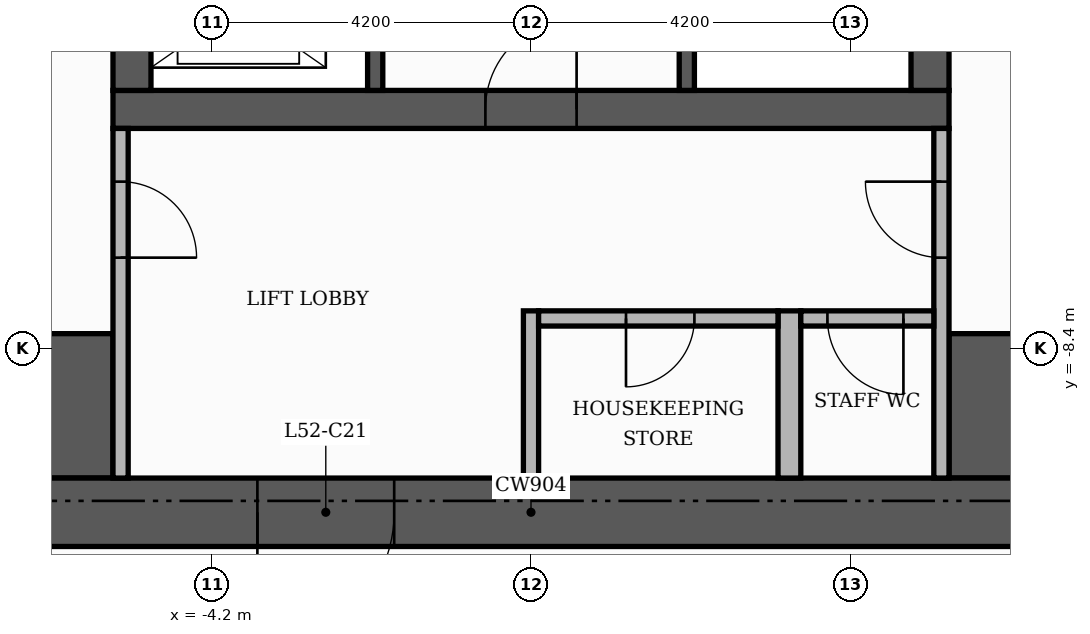
"""IFC4 building model, lengths in metres.
Left out: names, types, materials, properties, quantities, classifications, styles, units other than length and angle.
Written with IfcOpenShell. Run it as: python <this file> out.ifc"""

import sys

from ifc_helpers import new_model, si_unit, direction, frame, frame_2d, origin, place, context, subcontext, project, spatial, rectangle, extrude, element, fill, save


model = new_model("IFC4")
c1 = context("Model", 3, precision=1e-05, world=origin(), true_north=direction((0.0, 1.0)))
c2 = subcontext(c1, "Body", "Model", "MODEL_VIEW")
j1 = project(units=[si_unit("LENGTHUNIT", "METRE"), si_unit("PLANEANGLEUNIT", "RADIAN")], contexts=[c1])
p1 = place(None, origin())
s1 = spatial("IfcSite", under=j1, at=p1, CompositionType="ELEMENT")
p2 = place(p1, origin())
s2 = spatial("IfcBuilding", under=s1, at=p2, CompositionType="ELEMENT")
p3 = place(p2, frame((0.0, 0.0, 219.6)))
s3 = spatial("IfcBuildingStorey", under=s2, at=p3, CompositionType="ELEMENT", Elevation=219.6)
p4 = place(p3, frame((-5.5, -5.25, 0.0), z_axis=(0.0, 0.0, 1.0), x_axis=(1.0, 0.0, 0.0)))
e1 = element("IfcWall", 1, at=p4, inside=s3, PredefinedType="SHEAR", context=c2, shape_type="SweptSolid", body=[
    extrude(rectangle(XDim=11.0, YDim=0.5, at=frame_2d((5.5, 0.0))), origin(), (0.0, 0.0, 1.0), 3.48),
])
p5 = place(p4, frame((4.9, 0.0, 0.0)))
e2 = element("IfcOpeningElement", 2, at=p5, cuts=e1, PredefinedType="OPENING", context=c2, shape_type="SweptSolid", body=[
    extrude(rectangle(XDim=1.2, YDim=2.1, at=frame_2d((0.6, 1.05))), frame((0.0, 0.26, 0.0), z_axis=(0.0, -1.0, 0.0), x_axis=(1.0, 0.0, 0.0)), (0.0, 0.0, 1.0), 0.52),
])
for number, where, z_axis, x_axis in (
    (3, (-5.25, -5.0, 0.0), (0.0, 0.0, 1.0), (0.0, 1.0, 0.0)),
    (4, (5.25, -5.0, 0.0), (0.0, 0.0, 1.0), (0.0, 1.0, 0.0)),
):
    element("IfcWall", number, at=place(p3, frame(where, z_axis=z_axis, x_axis=x_axis)), inside=s3, PredefinedType="SHEAR", context=c2, shape_type="SweptSolid", body=[
        extrude(rectangle(XDim=10.5, YDim=0.5, at=frame_2d((5.25, 0.0))), origin(), (0.0, 0.0, 1.0), 3.48),
    ])
for number, where, z_axis, x_axis in (
    (5, (-10.1, -9.15, 0.0), (0.0, 0.0, 1.0), (1.0, 0.0, 0.0)),
    (6, (5.5, -9.15, 0.0), (0.0, 0.0, 1.0), (1.0, 0.0, 0.0)),
):
    element("IfcWall", number, at=place(p3, frame(where, z_axis=z_axis, x_axis=x_axis)), inside=s3, PredefinedType="SHEAR", context=c2, shape_type="SweptSolid", body=[
        extrude(rectangle(XDim=4.6, YDim=1.9, at=frame_2d((2.3, 0.0))), origin(), (0.0, 0.0, 1.0), 3.48),
    ])
p6 = place(p3, frame((2.05, -5.0, 0.0), z_axis=(0.0, 0.0, 1.0), x_axis=(0.0, 1.0, 0.0)))
e7 = element("IfcWall", 7, at=p6, inside=s3, PredefinedType="SHEAR", context=c2, shape_type="SweptSolid", body=[
    extrude(rectangle(XDim=6.6, YDim=0.2, at=frame_2d((3.3, 0.0))), origin(), (0.0, 0.0, 1.0), 3.48),
])
p7 = place(p6, frame((5.25, 0.0, 0.0)))
e8 = element("IfcOpeningElement", 8, at=p7, cuts=e7, PredefinedType="OPENING", context=c2, shape_type="SweptSolid", body=[
    extrude(rectangle(XDim=1.0, YDim=2.1, at=frame_2d((0.5, 1.05))), frame((0.0, 0.11, 0.0), z_axis=(0.0, -1.0, 0.0), x_axis=(1.0, 0.0, 0.0)), (0.0, 0.0, 1.0), 0.22),
])
p8 = place(p3, frame((-2.05, -5.0, 0.0), z_axis=(0.0, 0.0, 1.0), x_axis=(0.0, 1.0, 0.0)))
e9 = element("IfcWall", 9, at=p8, inside=s3, PredefinedType="SHEAR", context=c2, shape_type="SweptSolid", body=[
    extrude(rectangle(XDim=3.4, YDim=0.2, at=frame_2d((1.7, 0.0))), origin(), (0.0, 0.0, 1.0), 3.48),
])
p9 = place(p8, frame((0.55, 0.0, 0.0)))
e10 = element("IfcOpeningElement", 10, at=p9, cuts=e9, PredefinedType="OPENING", context=c2, shape_type="SweptSolid", body=[
    extrude(rectangle(XDim=1.1, YDim=2.1, at=frame_2d((0.55, 1.05))), frame((0.0, 0.11, 0.0), z_axis=(0.0, -1.0, 0.0), x_axis=(1.0, 0.0, 0.0)), (0.0, 0.0, 1.0), 0.22),
])
p10 = place(p8, frame((2.45, 0.0, 0.0)))
e11 = element("IfcOpeningElement", 11, at=p10, cuts=e9, PredefinedType="OPENING", context=c2, shape_type="SweptSolid", body=[
    extrude(rectangle(XDim=0.8, YDim=2.1, at=frame_2d((0.4, 1.05))), frame((0.0, 0.11, 0.0), z_axis=(0.0, -1.0, 0.0), x_axis=(1.0, 0.0, 0.0)), (0.0, 0.0, 1.0), 0.22),
])
p11 = place(p3, frame((-11.0, -10.55, 0.0), z_axis=(0.0, 0.0, 1.0), x_axis=(1.0, 0.0, 0.0)))
e12 = element("IfcWall", 12, at=p11, inside=s3, PredefinedType="SHEAR", context=c2, shape_type="SweptSolid", body=[
    extrude(rectangle(XDim=22.0, YDim=0.9, at=frame_2d((11.0, 0.0))), origin(), (0.0, 0.0, 1.0), 3.48),
])
p12 = place(p11, frame((7.4, 0.0, 0.0)))
e13 = element("IfcOpeningElement", 13, at=p12, cuts=e12, PredefinedType="OPENING", context=c2, shape_type="SweptSolid", body=[
    extrude(rectangle(XDim=1.8, YDim=2.2, at=frame_2d((0.9, 1.1))), frame((0.0, 0.46, 0.0), z_axis=(0.0, -1.0, 0.0), x_axis=(1.0, 0.0, 0.0)), (0.0, 0.0, 1.0), 0.92),
])
p13 = place(p3, frame((-5.4, -10.1, 0.0), z_axis=(0.0, 0.0, 1.0), x_axis=(0.0, 1.0, 0.0)))
e14 = element("IfcWall", 14, at=p13, inside=s3, PredefinedType="PARTITIONING", context=c2, shape_type="SweptSolid", body=[
    extrude(rectangle(XDim=4.6, YDim=0.2, at=frame_2d((2.3, 0.0))), origin(), (0.0, 0.0, 1.0), 3.48),
])
p14 = place(p13, frame((2.9, 0.0, 0.0)))
e15 = element("IfcOpeningElement", 15, at=p14, cuts=e14, PredefinedType="OPENING", context=c2, shape_type="SweptSolid", body=[
    extrude(rectangle(XDim=1.0, YDim=2.1, at=frame_2d((0.5, 1.05))), frame((0.0, 0.11, 0.0), z_axis=(0.0, -1.0, 0.0), x_axis=(1.0, 0.0, 0.0)), (0.0, 0.0, 1.0), 0.22),
])
p15 = place(p3, frame((0.0, -10.1, 0.0), z_axis=(0.0, 0.0, 1.0), x_axis=(0.0, 1.0, 0.0)))
e16 = element("IfcWall", 16, at=p15, inside=s3, PredefinedType="PARTITIONING", context=c2, shape_type="SweptSolid", body=[
    extrude(rectangle(XDim=2.2, YDim=0.2, at=frame_2d((1.1, 0.0))), origin(), (0.0, 0.0, 1.0), 3.48),
])
p16 = place(p3, frame((3.4, -10.1, 0.0), z_axis=(0.0, 0.0, 1.0), x_axis=(0.0, 1.0, 0.0)))
e17 = element("IfcWall", 17, at=p16, inside=s3, PredefinedType="PARTITIONING", context=c2, shape_type="SweptSolid", body=[
    extrude(rectangle(XDim=2.2, YDim=0.3, at=frame_2d((1.1, 0.0))), origin(), (0.0, 0.0, 1.0), 3.48),
])
p17 = place(p3, frame((5.4, -10.1, 0.0), z_axis=(0.0, 0.0, 1.0), x_axis=(0.0, 1.0, 0.0)))
e18 = element("IfcWall", 18, at=p17, inside=s3, PredefinedType="PARTITIONING", context=c2, shape_type="SweptSolid", body=[
    extrude(rectangle(XDim=4.6, YDim=0.2, at=frame_2d((2.3, 0.0))), origin(), (0.0, 0.0, 1.0), 3.48),
])
p18 = place(p17, frame((2.9, 0.0, 0.0)))
e19 = element("IfcOpeningElement", 19, at=p18, cuts=e18, PredefinedType="OPENING", context=c2, shape_type="SweptSolid", body=[
    extrude(rectangle(XDim=1.0, YDim=2.1, at=frame_2d((0.5, 1.05))), frame((0.0, 0.11, 0.0), z_axis=(0.0, -1.0, 0.0), x_axis=(1.0, 0.0, 0.0)), (0.0, 0.0, 1.0), 0.22),
])
p19 = place(p3, frame((0.1, -8.0, 0.0), z_axis=(0.0, 0.0, 1.0), x_axis=(1.0, 0.0, 0.0)))
e20 = element("IfcWall", 20, at=p19, inside=s3, PredefinedType="PARTITIONING", context=c2, shape_type="SweptSolid", body=[
    extrude(rectangle(XDim=3.15, YDim=0.2, at=frame_2d((1.575, 0.0))), origin(), (0.0, 0.0, 1.0), 3.48),
])
p20 = place(p19, frame((1.15, 0.0, 0.0)))
e21 = element("IfcOpeningElement", 21, at=p20, cuts=e20, PredefinedType="OPENING", context=c2, shape_type="SweptSolid", body=[
    extrude(rectangle(XDim=0.9, YDim=2.1, at=frame_2d((0.45, 1.05))), frame((0.0, 0.11, 0.0), z_axis=(0.0, -1.0, 0.0), x_axis=(1.0, 0.0, 0.0)), (0.0, 0.0, 1.0), 0.22),
])
p21 = place(p3, frame((3.55, -8.0, 0.0), z_axis=(0.0, 0.0, 1.0), x_axis=(1.0, 0.0, 0.0)))
e22 = element("IfcWall", 22, at=p21, inside=s3, PredefinedType="PARTITIONING", context=c2, shape_type="SweptSolid", body=[
    extrude(rectangle(XDim=1.75, YDim=0.2, at=frame_2d((0.875, 0.0))), origin(), (0.0, 0.0, 1.0), 3.48),
])
p22 = place(p21, frame((0.35, 0.0, 0.0)))
e23 = element("IfcOpeningElement", 23, at=p22, cuts=e22, PredefinedType="OPENING", context=c2, shape_type="SweptSolid", body=[
    extrude(rectangle(XDim=1.0, YDim=2.1, at=frame_2d((0.5, 1.05))), frame((0.0, 0.11, 0.0), z_axis=(0.0, -1.0, 0.0), x_axis=(1.0, 0.0, 0.0)), (0.0, 0.0, 1.0), 0.22),
])
p23 = place(p5, origin())
e24 = element("IfcDoor", 24, at=p23, inside=s3, OperationType="SINGLE_SWING_RIGHT", PredefinedType="DOOR", context=c2, shape_type="SweptSolid", body=[
    extrude(rectangle(XDim=1.2, YDim=2.1, at=frame_2d((0.6, 1.05))), frame((0.0, 0.025, 0.0), z_axis=(0.0, -1.0, 0.0), x_axis=(1.0, 0.0, 0.0)), (0.0, 0.0, 1.0), 0.05),
])
fill(e2, e24)
p24 = place(p14, frame((1.0, 0.0, 0.0), z_axis=(0.0, 0.0, 1.0), x_axis=(-1.0, 0.0, 0.0)))
e25 = element("IfcDoor", 25, at=p24, inside=s3, OperationType="SINGLE_SWING_LEFT", PredefinedType="DOOR", context=c2, shape_type="SweptSolid", body=[
    extrude(rectangle(XDim=1.0, YDim=2.1, at=frame_2d((0.5, 1.05))), frame((0.0, 0.025, 0.0), z_axis=(0.0, -1.0, 0.0), x_axis=(1.0, 0.0, 0.0)), (0.0, 0.0, 1.0), 0.05),
])
fill(e15, e25)
p25 = place(p18, origin())
e26 = element("IfcDoor", 26, at=p25, inside=s3, OperationType="SINGLE_SWING_RIGHT", PredefinedType="DOOR", context=c2, shape_type="SweptSolid", body=[
    extrude(rectangle(XDim=1.0, YDim=2.1, at=frame_2d((0.5, 1.05))), frame((0.0, 0.025, 0.0), z_axis=(0.0, -1.0, 0.0), x_axis=(1.0, 0.0, 0.0)), (0.0, 0.0, 1.0), 0.05),
])
fill(e19, e26)
p26 = place(p12, frame((1.8, 0.0, 0.0), z_axis=(0.0, 0.0, 1.0), x_axis=(-1.0, 0.0, 0.0)))
e27 = element("IfcDoor", 27, at=p26, inside=s3, OperationType="DOUBLE_DOOR_SINGLE_SWING", PredefinedType="DOOR", context=c2, shape_type="SweptSolid", body=[
    extrude(rectangle(XDim=1.8, YDim=2.2, at=frame_2d((0.9, 1.1))), frame((0.0, 0.025, 0.0), z_axis=(0.0, -1.0, 0.0), x_axis=(1.0, 0.0, 0.0)), (0.0, 0.0, 1.0), 0.05),
])
fill(e13, e27)
p27 = place(p20, frame((0.9, 0.0, 0.0), z_axis=(0.0, 0.0, 1.0), x_axis=(-1.0, 0.0, 0.0)))
e28 = element("IfcDoor", 28, at=p27, inside=s3, OperationType="SINGLE_SWING_LEFT", PredefinedType="DOOR", context=c2, shape_type="SweptSolid", body=[
    extrude(rectangle(XDim=0.9, YDim=2.1, at=frame_2d((0.45, 1.05))), frame((0.0, 0.025, 0.0), z_axis=(0.0, -1.0, 0.0), x_axis=(1.0, 0.0, 0.0)), (0.0, 0.0, 1.0), 0.05),
])
fill(e21, e28)
p28 = place(p22, frame((1.0, 0.0, 0.0), z_axis=(0.0, 0.0, 1.0), x_axis=(-1.0, 0.0, 0.0)))
e29 = element("IfcDoor", 29, at=p28, inside=s3, OperationType="SINGLE_SWING_RIGHT", PredefinedType="DOOR", context=c2, shape_type="SweptSolid", body=[
    extrude(rectangle(XDim=1.0, YDim=2.1, at=frame_2d((0.5, 1.05))), frame((0.0, 0.025, 0.0), z_axis=(0.0, -1.0, 0.0), x_axis=(1.0, 0.0, 0.0)), (0.0, 0.0, 1.0), 0.05),
])
fill(e23, e29)
save(model, sys.argv[1])
